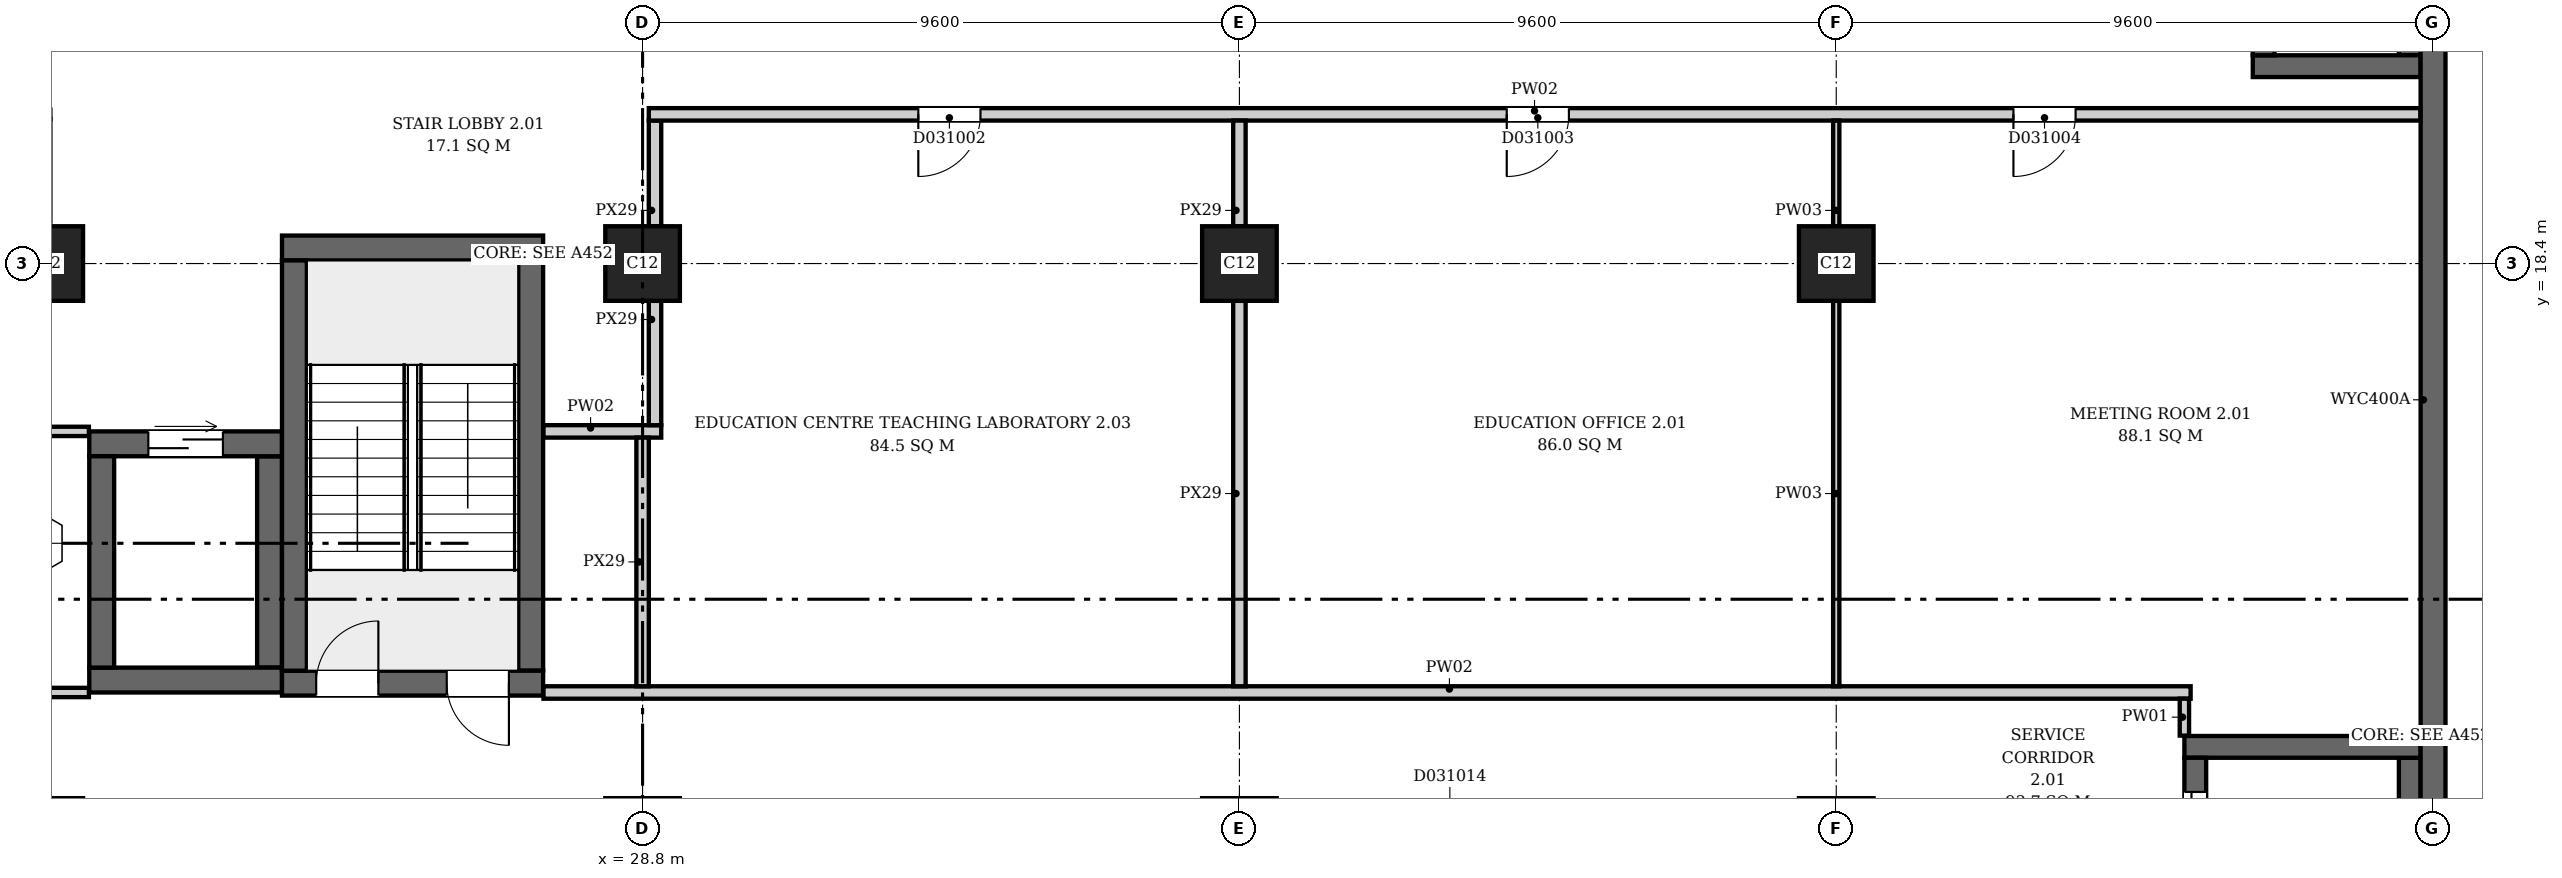
"""IFC4 building model, lengths in metres.
Left out: names, types, materials, properties, quantities, classifications, styles, units other than length and angle.
Written with IfcOpenShell. Run it as: python <this file> out.ifc"""

import sys

from ifc_helpers import new_model, si_unit, direction, frame, frame_2d, origin, origin_2d, place, context, subcontext, project, spatial, rectangle, extrude, element, fill, save


model = new_model("IFC4")
c1 = context("Model", 3, precision=1e-05, world=origin(), true_north=direction((0.0, 1.0)))
c2 = subcontext(c1, "Body", "Model", "MODEL_VIEW")
j1 = project(units=[si_unit("LENGTHUNIT", "METRE"), si_unit("PLANEANGLEUNIT", "RADIAN")], contexts=[c1])
p1 = place(None, origin())
s1 = spatial("IfcSite", under=j1, at=p1, CompositionType="ELEMENT")
p2 = place(p1, origin())
s2 = spatial("IfcBuilding", under=s1, at=p2, CompositionType="ELEMENT")
p3 = place(p2, frame((0.0, 0.0, 14.2)))
s3 = spatial("IfcBuildingStorey", under=s2, at=p3, CompositionType="ELEMENT", Elevation=14.2)
p4 = place(p3, frame((57.6, -0.2, 0.0), z_axis=(0.0, 0.0, 1.0), x_axis=(0.0, 1.0, 0.0)))
e1 = element("IfcWall", 1, at=p4, inside=s3, PredefinedType="SHEAR", context=c2, shape_type="SweptSolid", body=[
    extrude(rectangle(XDim=46.88, YDim=0.4, at=frame_2d((23.44, 0.0))), origin(), (0.0, 0.0, 1.0), 7.5),
])
p5 = place(p3, frame((23.0, 11.65, 0.0), z_axis=(0.0, 0.0, 1.0), x_axis=(1.0, 0.0, 0.0)))
e2 = element("IfcWall", 2, at=p5, inside=s3, PredefinedType="SHEAR", context=c2, shape_type="SweptSolid", body=[
    extrude(rectangle(XDim=4.2, YDim=0.4, at=frame_2d((2.1, 0.0))), origin(), (0.0, 0.0, 1.0), 7.5),
])
p6 = place(p5, frame((0.55, 0.0, 0.0)))
e3 = element("IfcOpeningElement", 3, at=p6, cuts=e2, PredefinedType="OPENING", context=c2, shape_type="SweptSolid", body=[
    extrude(rectangle(XDim=1.0, YDim=2.1, at=frame_2d((0.5, 1.05))), frame((0.0, 0.21, 0.0), z_axis=(0.0, -1.0, 0.0), x_axis=(1.0, 0.0, 0.0)), (0.0, 0.0, 1.0), 0.42),
])
p7 = place(p5, frame((2.65, 0.0, 0.0)))
e4 = element("IfcOpeningElement", 4, at=p7, cuts=e2, PredefinedType="OPENING", context=c2, shape_type="SweptSolid", body=[
    extrude(rectangle(XDim=1.0, YDim=2.1, at=frame_2d((0.5, 1.05))), frame((0.0, 0.21, 0.0), z_axis=(0.0, -1.0, 0.0), x_axis=(1.0, 0.0, 0.0)), (0.0, 0.0, 1.0), 0.42),
])
p8 = place(p3, frame((23.0, 18.65, 0.0), z_axis=(0.0, 0.0, 1.0), x_axis=(1.0, 0.0, 0.0)))
e5 = element("IfcWall", 5, at=p8, inside=s3, PredefinedType="SHEAR", context=c2, shape_type="SweptSolid", body=[
    extrude(rectangle(XDim=4.2, YDim=0.4, at=frame_2d((2.1, 0.0))), origin(), (0.0, 0.0, 1.0), 7.5),
])
for number, where, z_axis, x_axis in (
    (6, (23.2, 11.85, 0.0), (0.0, 0.0, 1.0), (0.0, 1.0, 0.0)),
    (7, (27.0, 11.85, 0.0), (0.0, 0.0, 1.0), (0.0, 1.0, 0.0)),
):
    element("IfcWall", number, at=place(p3, frame(where, z_axis=z_axis, x_axis=x_axis)), inside=s3, PredefinedType="SHEAR", context=c2, shape_type="SweptSolid", body=[
        extrude(rectangle(XDim=6.6, YDim=0.4, at=frame_2d((3.3, 0.0))), origin(), (0.0, 0.0, 1.0), 7.5),
    ])
p9 = place(p3, frame((53.6, 10.625, 0.0), z_axis=(0.0, 0.0, 1.0), x_axis=(1.0, 0.0, 0.0)))
e8 = element("IfcWall", 8, at=p9, inside=s3, PredefinedType="SHEAR", context=c2, shape_type="SweptSolid", body=[
    extrude(rectangle(XDim=3.8, YDim=0.35, at=frame_2d((1.9, 0.0))), origin(), (0.0, 0.0, 1.0), 7.5),
])
p10 = place(p3, frame((53.775, 8.25, 0.0), z_axis=(0.0, 0.0, 1.0), x_axis=(0.0, 1.0, 0.0)))
e9 = element("IfcWall", 9, at=p10, inside=s3, PredefinedType="SHEAR", context=c2, shape_type="SweptSolid", body=[
    extrude(rectangle(XDim=2.2, YDim=0.35, at=frame_2d((1.1, 0.0))), origin(), (0.0, 0.0, 1.0), 7.5),
])
p11 = place(p10, frame((0.55, 0.0, 0.0)))
e10 = element("IfcOpeningElement", 10, at=p11, cuts=e9, PredefinedType="OPENING", context=c2, shape_type="SweptSolid", body=[
    extrude(rectangle(XDim=1.1, YDim=2.1, at=frame_2d((0.55, 1.05))), frame((0.0, 0.185, 0.0), z_axis=(0.0, -1.0, 0.0), x_axis=(1.0, 0.0, 0.0)), (0.0, 0.0, 1.0), 0.37),
])
p12 = place(p3, frame((57.225, 8.25, 0.0), z_axis=(0.0, 0.0, 1.0), x_axis=(0.0, 1.0, 0.0)))
e11 = element("IfcWall", 11, at=p12, inside=s3, PredefinedType="SHEAR", context=c2, shape_type="SweptSolid", body=[
    extrude(rectangle(XDim=2.2, YDim=0.35, at=frame_2d((1.1, 0.0))), origin(), (0.0, 0.0, 1.0), 7.5),
])
p13 = place(p3, frame((54.7, 21.575, 0.0), z_axis=(0.0, 0.0, 1.0), x_axis=(1.0, 0.0, 0.0)))
e12 = element("IfcWall", 12, at=p13, inside=s3, PredefinedType="SHEAR", context=c2, shape_type="SweptSolid", body=[
    extrude(rectangle(XDim=2.7, YDim=0.35, at=frame_2d((1.35, 0.0))), origin(), (0.0, 0.0, 1.0), 7.5),
])
for number, where, z_axis, x_axis in (
    (13, (54.875, 21.75, 0.0), (0.0, 0.0, 1.0), (0.0, 1.0, 0.0)),
    (14, (57.225, 21.75, 0.0), (0.0, 0.0, 1.0), (0.0, 1.0, 0.0)),
):
    element("IfcWall", number, at=place(p3, frame(where, z_axis=z_axis, x_axis=x_axis)), inside=s3, PredefinedType="SHEAR", context=c2, shape_type="SweptSolid", body=[
        extrude(rectangle(XDim=3.5, YDim=0.35, at=frame_2d((1.75, 0.0))), origin(), (0.0, 0.0, 1.0), 7.5),
    ])
p14 = place(p3, frame((19.9, 11.7, 0.0), z_axis=(0.0, 0.0, 1.0), x_axis=(1.0, 0.0, 0.0)))
e15 = element("IfcWall", 15, at=p14, inside=s3, PredefinedType="SHEAR", context=c2, shape_type="SweptSolid", body=[
    extrude(rectangle(XDim=3.1, YDim=0.4, at=frame_2d((1.55, 0.0))), origin(), (0.0, 0.0, 1.0), 7.5),
])
p15 = place(p3, frame((19.9, 15.5, 0.0), z_axis=(0.0, 0.0, 1.0), x_axis=(1.0, 0.0, 0.0)))
e16 = element("IfcWall", 16, at=p15, inside=s3, PredefinedType="SHEAR", context=c2, shape_type="SweptSolid", body=[
    extrude(rectangle(XDim=3.1, YDim=0.4, at=frame_2d((1.55, 0.0))), origin(), (0.0, 0.0, 1.0), 7.5),
])
p16 = place(p15, frame((0.95, 0.0, 0.0)))
e17 = element("IfcOpeningElement", 17, at=p16, cuts=e16, PredefinedType="OPENING", context=c2, shape_type="SweptSolid", body=[
    extrude(rectangle(XDim=1.2, YDim=2.1, at=frame_2d((0.6, 1.05))), frame((0.0, 0.21, 0.0), z_axis=(0.0, -1.0, 0.0), x_axis=(1.0, 0.0, 0.0)), (0.0, 0.0, 1.0), 0.42),
])
for number, where, z_axis, x_axis in (
    (18, (20.1, 11.9, 0.0), (0.0, 0.0, 1.0), (0.0, 1.0, 0.0)),
    (19, (22.8, 11.9, 0.0), (0.0, 0.0, 1.0), (0.0, 1.0, 0.0)),
):
    element("IfcWall", number, at=place(p3, frame(where, z_axis=z_axis, x_axis=x_axis)), inside=s3, PredefinedType="SHEAR", context=c2, shape_type="SweptSolid", body=[
        extrude(rectangle(XDim=3.4, YDim=0.4, at=frame_2d((1.7, 0.0))), origin(), (0.0, 0.0, 1.0), 7.5),
    ])
for number, where, z_axis, x_axis in (
    (20, (19.2, 18.4, 0.0), (0.0, 0.0, 1.0), (1.0, 0.0, 0.0)),
    (21, (28.8, 18.4, 0.0), (0.0, 0.0, 1.0), (1.0, 0.0, 0.0)),
    (22, (38.4, 18.4, 0.0), (0.0, 0.0, 1.0), (1.0, 0.0, 0.0)),
    (23, (48.0, 18.4, 0.0), (0.0, 0.0, 1.0), (1.0, 0.0, 0.0)),
):
    element("IfcColumn", number, at=place(p3, frame(where, z_axis=z_axis, x_axis=x_axis)), inside=s3, PredefinedType="COLUMN", context=c2, shape_type="SweptSolid", body=[
        extrude(rectangle(XDim=1.2, YDim=1.2, at=origin_2d()), origin(), (0.0, 0.0, 1.0), 7.5),
    ])
p17 = place(p3, frame((10.325, 11.5, 0.0), z_axis=(0.0, 0.0, 1.0), x_axis=(1.0, 0.0, 0.0)))
e24 = element("IfcWall", 24, at=p17, inside=s3, PredefinedType="PARTITIONING", context=c2, shape_type="SweptSolid", body=[
    extrude(rectangle(XDim=9.569, YDim=0.15, at=frame_2d((4.785, 0.0))), origin(), (0.0, 0.0, 1.0), 7.15),
])
p18 = place(p3, frame((16.206, 15.7, 0.0), z_axis=(0.0, 0.0, 1.0), x_axis=(1.0, 0.0, 0.0)))
e25 = element("IfcWall", 25, at=p18, inside=s3, PredefinedType="PARTITIONING", context=c2, shape_type="SweptSolid", body=[
    extrude(rectangle(XDim=3.688, YDim=0.15, at=frame_2d((1.844, 0.0))), origin(), (0.0, 0.0, 1.0), 7.15),
])
p19 = place(p3, frame((27.206, 11.5, 0.0), z_axis=(0.0, 0.0, 1.0), x_axis=(1.0, 0.0, 0.0)))
e26 = element("IfcWall", 26, at=p19, inside=s3, PredefinedType="PARTITIONING", context=c2, shape_type="SweptSolid", body=[
    extrude(rectangle(XDim=26.494, YDim=0.2, at=frame_2d((13.247, 0.0))), origin(), (0.0, 0.0, 1.0), 7.15),
])
p20 = place(p3, frame((27.206, 15.7, 0.0), z_axis=(0.0, 0.0, 1.0), x_axis=(1.0, 0.0, 0.0)))
e27 = element("IfcWall", 27, at=p20, inside=s3, PredefinedType="PARTITIONING", context=c2, shape_type="SweptSolid", body=[
    extrude(rectangle(XDim=1.894, YDim=0.2, at=frame_2d((0.947, 0.0))), origin(), (0.0, 0.0, 1.0), 7.15),
])
p21 = place(p3, frame((28.8, 11.6, 0.0), z_axis=(0.0, 0.0, 1.0), x_axis=(0.0, 1.0, 0.0)))
e28 = element("IfcWall", 28, at=p21, inside=s3, PredefinedType="PARTITIONING", context=c2, shape_type="SweptSolid", body=[
    extrude(rectangle(XDim=4.0, YDim=0.2, at=frame_2d((2.0, 0.0))), origin(), (0.0, 0.0, 1.0), 6.75),
])
p22 = place(p3, frame((29.0, 15.8, 0.0), z_axis=(0.0, 0.0, 1.0), x_axis=(0.0, 1.0, 0.0)))
e29 = element("IfcWall", 29, at=p22, inside=s3, PredefinedType="PARTITIONING", context=c2, shape_type="SweptSolid", body=[
    extrude(rectangle(XDim=2.0, YDim=0.2, at=frame_2d((1.0, 0.0))), origin(), (0.0, 0.0, 1.0), 6.75),
])
p23 = place(p3, frame((29.0, 19.0, 0.0), z_axis=(0.0, 0.0, 1.0), x_axis=(0.0, 1.0, 0.0)))
e30 = element("IfcWall", 30, at=p23, inside=s3, PredefinedType="PARTITIONING", context=c2, shape_type="SweptSolid", body=[
    extrude(rectangle(XDim=1.7, YDim=0.2, at=frame_2d((0.85, 0.0))), origin(), (0.0, 0.0, 1.0), 6.75),
])
p24 = place(p3, frame((28.9, 20.8, 0.0), z_axis=(0.0, 0.0, 1.0), x_axis=(1.0, 0.0, 0.0)))
e31 = element("IfcWall", 31, at=p24, inside=s3, PredefinedType="PARTITIONING", context=c2, shape_type="SweptSolid", body=[
    extrude(rectangle(XDim=28.494, YDim=0.2, at=frame_2d((14.247, 0.0))), origin(), (0.0, 0.0, 1.0), 7.15),
])
p25 = place(p24, frame((4.335, 0.0, 0.0)))
e32 = element("IfcOpeningElement", 32, at=p25, cuts=e31, PredefinedType="OPENING", context=c2, shape_type="SweptSolid", body=[
    extrude(rectangle(XDim=1.0, YDim=2.1, at=frame_2d((0.5, 1.05))), frame((0.0, 0.11, 0.0), z_axis=(0.0, -1.0, 0.0), x_axis=(1.0, 0.0, 0.0)), (0.0, 0.0, 1.0), 0.22),
])
p26 = place(p24, frame((13.8, 0.0, 0.0)))
e33 = element("IfcOpeningElement", 33, at=p26, cuts=e31, PredefinedType="OPENING", context=c2, shape_type="SweptSolid", body=[
    extrude(rectangle(XDim=1.0, YDim=2.1, at=frame_2d((0.5, 1.05))), frame((0.0, 0.11, 0.0), z_axis=(0.0, -1.0, 0.0), x_axis=(1.0, 0.0, 0.0)), (0.0, 0.0, 1.0), 0.22),
])
p27 = place(p24, frame((21.95, 0.0, 0.0)))
e34 = element("IfcOpeningElement", 34, at=p27, cuts=e31, PredefinedType="OPENING", context=c2, shape_type="SweptSolid", body=[
    extrude(rectangle(XDim=1.0, YDim=2.1, at=frame_2d((0.5, 1.05))), frame((0.0, 0.11, 0.0), z_axis=(0.0, -1.0, 0.0), x_axis=(1.0, 0.0, 0.0)), (0.0, 0.0, 1.0), 0.22),
])
p28 = place(p3, frame((38.4, 11.6, 0.0), z_axis=(0.0, 0.0, 1.0), x_axis=(0.0, 1.0, 0.0)))
e35 = element("IfcWall", 35, at=p28, inside=s3, PredefinedType="PARTITIONING", context=c2, shape_type="SweptSolid", body=[
    extrude(rectangle(XDim=6.2, YDim=0.2, at=frame_2d((3.1, 0.0))), origin(), (0.0, 0.0, 1.0), 6.75),
])
p29 = place(p3, frame((38.4, 19.0, 0.0), z_axis=(0.0, 0.0, 1.0), x_axis=(0.0, 1.0, 0.0)))
e36 = element("IfcWall", 36, at=p29, inside=s3, PredefinedType="PARTITIONING", context=c2, shape_type="SweptSolid", body=[
    extrude(rectangle(XDim=1.7, YDim=0.2, at=frame_2d((0.85, 0.0))), origin(), (0.0, 0.0, 1.0), 6.75),
])
p30 = place(p3, frame((48.0, 11.6, 0.0), z_axis=(0.0, 0.0, 1.0), x_axis=(0.0, 1.0, 0.0)))
e37 = element("IfcWall", 37, at=p30, inside=s3, PredefinedType="PARTITIONING", context=c2, shape_type="SweptSolid", body=[
    extrude(rectangle(XDim=6.2, YDim=0.1, at=frame_2d((3.1, 0.0))), origin(), (0.0, 0.0, 1.0), 6.75),
])
p31 = place(p3, frame((48.0, 19.0, 0.0), z_axis=(0.0, 0.0, 1.0), x_axis=(0.0, 1.0, 0.0)))
e38 = element("IfcWall", 38, at=p31, inside=s3, PredefinedType="PARTITIONING", context=c2, shape_type="SweptSolid", body=[
    extrude(rectangle(XDim=1.7, YDim=0.1, at=frame_2d((0.85, 0.0))), origin(), (0.0, 0.0, 1.0), 6.75),
])
p32 = place(p3, frame((53.6, 10.806, 0.0), z_axis=(0.0, 0.0, 1.0), x_axis=(0.0, 1.0, 0.0)))
e39 = element("IfcWall", 39, at=p32, inside=s3, PredefinedType="PARTITIONING", context=c2, shape_type="SweptSolid", body=[
    extrude(rectangle(XDim=0.594, YDim=0.15, at=frame_2d((0.297, 0.0))), origin(), (0.0, 0.0, 1.0), 7.15),
])
p33 = place(p6, origin())
e40 = element("IfcDoor", 40, at=p33, inside=s3, OperationType="SINGLE_SWING_RIGHT", PredefinedType="DOOR", context=c2, shape_type="SweptSolid", body=[
    extrude(rectangle(XDim=1.0, YDim=2.1, at=frame_2d((0.5, 1.05))), frame((0.0, 0.025, 0.0), z_axis=(0.0, -1.0, 0.0), x_axis=(1.0, 0.0, 0.0)), (0.0, 0.0, 1.0), 0.05),
])
fill(e3, e40)
p34 = place(p7, origin())
e41 = element("IfcDoor", 41, at=p34, inside=s3, OperationType="SINGLE_SWING_LEFT", PredefinedType="DOOR", context=c2, shape_type="SweptSolid", body=[
    extrude(rectangle(XDim=1.0, YDim=2.1, at=frame_2d((0.5, 1.05))), frame((0.0, 0.025, 0.0), z_axis=(0.0, -1.0, 0.0), x_axis=(1.0, 0.0, 0.0)), (0.0, 0.0, 1.0), 0.05),
])
fill(e4, e41)
p35 = place(p11, origin())
e42 = element("IfcDoor", 42, at=p35, inside=s3, OperationType="DOUBLE_DOOR_SLIDING", PredefinedType="DOOR", context=c2, shape_type="SweptSolid", body=[
    extrude(rectangle(XDim=1.1, YDim=2.1, at=frame_2d((0.55, 1.05))), frame((0.0, 0.025, 0.0), z_axis=(0.0, -1.0, 0.0), x_axis=(1.0, 0.0, 0.0)), (0.0, 0.0, 1.0), 0.05),
])
fill(e10, e42)
p36 = place(p16, origin())
e43 = element("IfcDoor", 43, at=p36, inside=s3, OperationType="DOUBLE_DOOR_SLIDING", PredefinedType="DOOR", context=c2, shape_type="SweptSolid", body=[
    extrude(rectangle(XDim=1.2, YDim=2.1, at=frame_2d((0.6, 1.05))), frame((0.0, 0.025, 0.0), z_axis=(0.0, -1.0, 0.0), x_axis=(1.0, 0.0, 0.0)), (0.0, 0.0, 1.0), 0.05),
])
fill(e17, e43)
p37 = place(p25, origin())
e44 = element("IfcDoor", 44, at=p37, inside=s3, OperationType="SINGLE_SWING_LEFT", PredefinedType="DOOR", context=c2, shape_type="SweptSolid", body=[
    extrude(rectangle(XDim=1.0, YDim=2.1, at=frame_2d((0.5, 1.05))), frame((0.0, 0.025, 0.0), z_axis=(0.0, -1.0, 0.0), x_axis=(1.0, 0.0, 0.0)), (0.0, 0.0, 1.0), 0.05),
])
fill(e32, e44)
p38 = place(p26, origin())
e45 = element("IfcDoor", 45, at=p38, inside=s3, OperationType="SINGLE_SWING_LEFT", PredefinedType="DOOR", context=c2, shape_type="SweptSolid", body=[
    extrude(rectangle(XDim=1.0, YDim=2.1, at=frame_2d((0.5, 1.05))), frame((0.0, 0.025, 0.0), z_axis=(0.0, -1.0, 0.0), x_axis=(1.0, 0.0, 0.0)), (0.0, 0.0, 1.0), 0.05),
])
fill(e33, e45)
p39 = place(p27, origin())
e46 = element("IfcDoor", 46, at=p39, inside=s3, OperationType="SINGLE_SWING_LEFT", PredefinedType="DOOR", context=c2, shape_type="SweptSolid", body=[
    extrude(rectangle(XDim=1.0, YDim=2.1, at=frame_2d((0.5, 1.05))), frame((0.0, 0.025, 0.0), z_axis=(0.0, -1.0, 0.0), x_axis=(1.0, 0.0, 0.0)), (0.0, 0.0, 1.0), 0.05),
])
fill(e34, e46)
save(model, sys.argv[1])
